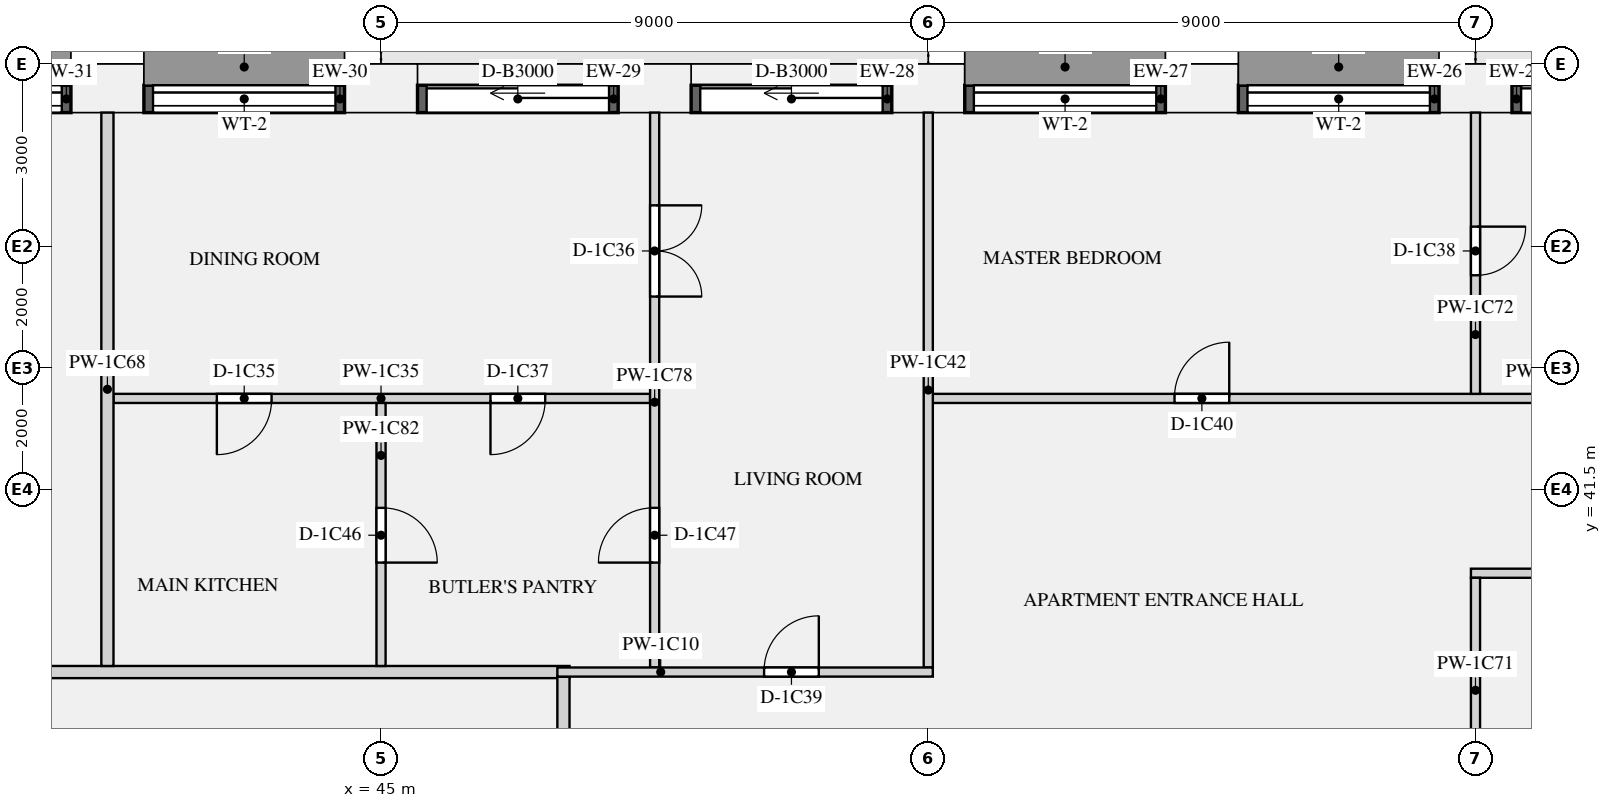
"""IFC4 building model, lengths in metres.
Left out: names, types, materials, properties, quantities, classifications, styles, units other than length and angle.
Written with IfcOpenShell. Run it as: python <this file> out.ifc"""

import sys

from ifc_helpers import new_model, si_unit, direction, frame, frame_2d, origin, origin_2d, place, context, subcontext, project, spatial, rectangle, extrude, element, fill, save


model = new_model("IFC4")
c1 = context("Model", 3, precision=1e-05, world=origin(), true_north=direction((0.0, 1.0)))
c2 = subcontext(c1, "Body", "Model", "MODEL_VIEW")
j1 = project(units=[si_unit("LENGTHUNIT", "METRE"), si_unit("PLANEANGLEUNIT", "RADIAN")], contexts=[c1])
p1 = place(None, origin())
s1 = spatial("IfcSite", under=j1, at=p1, CompositionType="ELEMENT")
p2 = place(p1, origin())
s2 = spatial("IfcBuilding", under=s1, at=p2, CompositionType="ELEMENT")
p3 = place(p2, frame((0.0, 0.0, 38.4)))
s3 = spatial("IfcBuildingStorey", under=s2, at=p3, CompositionType="ELEMENT", Elevation=38.4)
for number, where, z_axis, x_axis in (
    (1, (63.0, 48.1, 0.0), (0.0, 0.0, 1.0), (-1.0, 0.0, 0.0)),
    (2, (58.5, 48.1, 0.0), (0.0, 0.0, 1.0), (-1.0, 0.0, 0.0)),
    (3, (54.0, 48.1, 0.0), (0.0, 0.0, 1.0), (-1.0, 0.0, 0.0)),
    (4, (49.5, 48.1, 0.0), (0.0, 0.0, 1.0), (-1.0, 0.0, 0.0)),
    (5, (45.0, 48.1, 0.0), (0.0, 0.0, 1.0), (-1.0, 0.0, 0.0)),
    (6, (40.5, 48.1, 0.0), (0.0, 0.0, 1.0), (-1.0, 0.0, 0.0)),
):
    element("IfcColumn", number, at=place(p3, frame(where, z_axis=z_axis, x_axis=x_axis)), inside=s3, PredefinedType="USERDEFINED", context=c2, shape_type="SweptSolid", body=[
        extrude(rectangle(XDim=1.2, YDim=0.8, at=origin_2d()), origin(), (0.0, 0.0, 1.0), 3.15),
    ])
p4 = place(p3, frame((66.9, 47.925, 0.0), z_axis=(0.0, 0.0, 1.0), x_axis=(-1.0, 0.0, 0.0)))
e7 = element("IfcWall", 7, at=p4, inside=s3, PredefinedType="SOLIDWALL", context=c2, shape_type="SweptSolid", body=[
    extrude(rectangle(XDim=3.3, YDim=0.45, at=frame_2d((1.65, 0.0))), origin(), (0.0, 0.0, 1.0), 2.83),
])
p5 = place(p4, frame((0.15, 0.0, 0.0)))
e8 = element("IfcOpeningElement", 8, at=p5, cuts=e7, PredefinedType="OPENING", context=c2, shape_type="SweptSolid", body=[
    extrude(rectangle(XDim=3.0, YDim=2.3, at=frame_2d((1.5, 1.15))), frame((0.0, 0.235, 0.0), z_axis=(0.0, -1.0, 0.0), x_axis=(1.0, 0.0, 0.0)), (0.0, 0.0, 1.0), 0.47),
])
p6 = place(p3, frame((62.4, 47.925, 0.9), z_axis=(0.0, 0.0, 1.0), x_axis=(-1.0, 0.0, 0.0)))
e9 = element("IfcWall", 9, at=p6, inside=s3, PredefinedType="SOLIDWALL", context=c2, shape_type="SweptSolid", body=[
    extrude(rectangle(XDim=3.3, YDim=0.45, at=frame_2d((1.65, 0.0))), origin(), (0.0, 0.0, 1.0), 1.93),
])
p7 = place(p6, frame((0.15, 0.0, 0.15)))
e10 = element("IfcOpeningElement", 10, at=p7, cuts=e9, PredefinedType="OPENING", context=c2, shape_type="SweptSolid", body=[
    extrude(rectangle(XDim=3.0, YDim=1.5, at=frame_2d((1.5, 0.75))), frame((0.0, 0.235, 0.0), z_axis=(0.0, -1.0, 0.0), x_axis=(1.0, 0.0, 0.0)), (0.0, 0.0, 1.0), 0.47),
])
p8 = place(p3, frame((57.9, 47.925, 0.9), z_axis=(0.0, 0.0, 1.0), x_axis=(-1.0, 0.0, 0.0)))
e11 = element("IfcWall", 11, at=p8, inside=s3, PredefinedType="SOLIDWALL", context=c2, shape_type="SweptSolid", body=[
    extrude(rectangle(XDim=3.3, YDim=0.45, at=frame_2d((1.65, 0.0))), origin(), (0.0, 0.0, 1.0), 1.93),
])
p9 = place(p8, frame((0.15, 0.0, 0.15)))
e12 = element("IfcOpeningElement", 12, at=p9, cuts=e11, PredefinedType="OPENING", context=c2, shape_type="SweptSolid", body=[
    extrude(rectangle(XDim=3.0, YDim=1.5, at=frame_2d((1.5, 0.75))), frame((0.0, 0.235, 0.0), z_axis=(0.0, -1.0, 0.0), x_axis=(1.0, 0.0, 0.0)), (0.0, 0.0, 1.0), 0.47),
])
p10 = place(p3, frame((53.4, 47.925, 0.0), z_axis=(0.0, 0.0, 1.0), x_axis=(-1.0, 0.0, 0.0)))
e13 = element("IfcWall", 13, at=p10, inside=s3, PredefinedType="SOLIDWALL", context=c2, shape_type="SweptSolid", body=[
    extrude(rectangle(XDim=3.3, YDim=0.45, at=frame_2d((1.65, 0.0))), origin(), (0.0, 0.0, 1.0), 2.83),
])
p11 = place(p10, frame((0.15, 0.0, 0.0)))
e14 = element("IfcOpeningElement", 14, at=p11, cuts=e13, PredefinedType="OPENING", context=c2, shape_type="SweptSolid", body=[
    extrude(rectangle(XDim=3.0, YDim=2.3, at=frame_2d((1.5, 1.15))), frame((0.0, 0.235, 0.0), z_axis=(0.0, -1.0, 0.0), x_axis=(1.0, 0.0, 0.0)), (0.0, 0.0, 1.0), 0.47),
])
p12 = place(p3, frame((48.9, 47.925, 0.0), z_axis=(0.0, 0.0, 1.0), x_axis=(-1.0, 0.0, 0.0)))
e15 = element("IfcWall", 15, at=p12, inside=s3, PredefinedType="SOLIDWALL", context=c2, shape_type="SweptSolid", body=[
    extrude(rectangle(XDim=3.3, YDim=0.45, at=frame_2d((1.65, 0.0))), origin(), (0.0, 0.0, 1.0), 2.83),
])
p13 = place(p12, frame((0.15, 0.0, 0.0)))
e16 = element("IfcOpeningElement", 16, at=p13, cuts=e15, PredefinedType="OPENING", context=c2, shape_type="SweptSolid", body=[
    extrude(rectangle(XDim=3.0, YDim=2.3, at=frame_2d((1.5, 1.15))), frame((0.0, 0.235, 0.0), z_axis=(0.0, -1.0, 0.0), x_axis=(1.0, 0.0, 0.0)), (0.0, 0.0, 1.0), 0.47),
])
p14 = place(p3, frame((44.4, 47.925, 0.9), z_axis=(0.0, 0.0, 1.0), x_axis=(-1.0, 0.0, 0.0)))
e17 = element("IfcWall", 17, at=p14, inside=s3, PredefinedType="SOLIDWALL", context=c2, shape_type="SweptSolid", body=[
    extrude(rectangle(XDim=3.3, YDim=0.45, at=frame_2d((1.65, 0.0))), origin(), (0.0, 0.0, 1.0), 1.93),
])
p15 = place(p14, frame((0.15, 0.0, 0.15)))
e18 = element("IfcOpeningElement", 18, at=p15, cuts=e17, PredefinedType="OPENING", context=c2, shape_type="SweptSolid", body=[
    extrude(rectangle(XDim=3.0, YDim=1.5, at=frame_2d((1.5, 0.75))), frame((0.0, 0.235, 0.0), z_axis=(0.0, -1.0, 0.0), x_axis=(1.0, 0.0, 0.0)), (0.0, 0.0, 1.0), 0.47),
])
p16 = place(p3, frame((39.9, 47.925, 0.9), z_axis=(0.0, 0.0, 1.0), x_axis=(-1.0, 0.0, 0.0)))
e19 = element("IfcWall", 19, at=p16, inside=s3, PredefinedType="SOLIDWALL", context=c2, shape_type="SweptSolid", body=[
    extrude(rectangle(XDim=3.3, YDim=0.45, at=frame_2d((1.65, 0.0))), origin(), (0.0, 0.0, 1.0), 1.93),
])
p17 = place(p16, frame((0.15, 0.0, 0.15)))
e20 = element("IfcOpeningElement", 20, at=p17, cuts=e19, PredefinedType="OPENING", context=c2, shape_type="SweptSolid", body=[
    extrude(rectangle(XDim=3.0, YDim=1.5, at=frame_2d((1.5, 0.75))), frame((0.0, 0.235, 0.0), z_axis=(0.0, -1.0, 0.0), x_axis=(1.0, 0.0, 0.0)), (0.0, 0.0, 1.0), 0.47),
])
p18 = place(p3, frame((47.9, 38.5, 0.0), z_axis=(0.0, 0.0, 1.0), x_axis=(1.0, 0.0, 0.0)))
e21 = element("IfcWall", 21, at=p18, inside=s3, PredefinedType="PARTITIONING", context=c2, shape_type="SweptSolid", body=[
    extrude(rectangle(XDim=6.175, YDim=0.15, at=frame_2d((3.087, 0.0))), origin(), (0.0, 0.0, 1.0), 2.83),
])
p19 = place(p18, frame((3.4, 0.0, 0.0)))
e22 = element("IfcOpeningElement", 22, at=p19, cuts=e21, PredefinedType="OPENING", context=c2, shape_type="SweptSolid", body=[
    extrude(rectangle(XDim=0.9, YDim=2.1, at=frame_2d((0.45, 1.05))), frame((0.0, 0.085, 0.0), z_axis=(0.0, -1.0, 0.0), x_axis=(1.0, 0.0, 0.0)), (0.0, 0.0, 1.0), 0.17),
])
p20 = place(p3, frame((23.9, 38.5, 0.0), z_axis=(0.0, 0.0, 1.0), x_axis=(1.0, 0.0, 0.0)))
e23 = element("IfcWall", 23, at=p20, inside=s3, PredefinedType="PARTITIONING", context=c2, shape_type="SweptSolid", body=[
    extrude(rectangle(XDim=24.2, YDim=0.2, at=frame_2d((12.1, 0.0))), origin(), (0.0, 0.0, 1.0), 2.83),
])
p21 = place(p20, frame((3.55, 0.0, 0.0)))
e24 = element("IfcOpeningElement", 24, at=p21, cuts=e23, PredefinedType="OPENING", context=c2, shape_type="SweptSolid", body=[
    extrude(rectangle(XDim=1.1, YDim=2.1, at=frame_2d((0.55, 1.05))), frame((0.0, 0.11, 0.0), z_axis=(0.0, -1.0, 0.0), x_axis=(1.0, 0.0, 0.0)), (0.0, 0.0, 1.0), 0.22),
])
p22 = place(p3, frame((62.925, 40.125, 0.0), z_axis=(0.0, 0.0, 1.0), x_axis=(1.0, 0.0, 0.0)))
e25 = element("IfcWall", 25, at=p22, inside=s3, PredefinedType="PARTITIONING", context=c2, shape_type="SweptSolid", body=[
    extrude(rectangle(XDim=12.775, YDim=0.15, at=frame_2d((6.387, 0.0))), origin(), (0.0, 0.0, 1.0), 2.83),
])
p23 = place(p22, frame((4.125, 0.0, 0.0)))
e26 = element("IfcOpeningElement", 26, at=p23, cuts=e25, PredefinedType="OPENING", context=c2, shape_type="SweptSolid", body=[
    extrude(rectangle(XDim=0.9, YDim=2.1, at=frame_2d((0.45, 1.05))), frame((0.0, 0.085, 0.0), z_axis=(0.0, -1.0, 0.0), x_axis=(1.0, 0.0, 0.0)), (0.0, 0.0, 1.0), 0.17),
])
p24 = place(p3, frame((40.6, 43.0, 0.0), z_axis=(0.0, 0.0, 1.0), x_axis=(1.0, 0.0, 0.0)))
e27 = element("IfcWall", 27, at=p24, inside=s3, PredefinedType="PARTITIONING", context=c2, shape_type="SweptSolid", body=[
    extrude(rectangle(XDim=8.825, YDim=0.15, at=frame_2d((4.413, 0.0))), origin(), (0.0, 0.0, 1.0), 2.83),
])
p25 = place(p24, frame((1.7, 0.0, 0.0)))
e28 = element("IfcOpeningElement", 28, at=p25, cuts=e27, PredefinedType="OPENING", context=c2, shape_type="SweptSolid", body=[
    extrude(rectangle(XDim=0.9, YDim=2.1, at=frame_2d((0.45, 1.05))), frame((0.0, 0.085, 0.0), z_axis=(0.0, -1.0, 0.0), x_axis=(1.0, 0.0, 0.0)), (0.0, 0.0, 1.0), 0.17),
])
p26 = place(p24, frame((6.2, 0.0, 0.0)))
e29 = element("IfcOpeningElement", 29, at=p26, cuts=e27, PredefinedType="OPENING", context=c2, shape_type="SweptSolid", body=[
    extrude(rectangle(XDim=0.9, YDim=2.1, at=frame_2d((0.45, 1.05))), frame((0.0, 0.085, 0.0), z_axis=(0.0, -1.0, 0.0), x_axis=(1.0, 0.0, 0.0)), (0.0, 0.0, 1.0), 0.17),
])
p27 = place(p3, frame((54.075, 43.0, 0.0), z_axis=(0.0, 0.0, 1.0), x_axis=(1.0, 0.0, 0.0)))
e30 = element("IfcWall", 30, at=p27, inside=s3, PredefinedType="PARTITIONING", context=c2, shape_type="SweptSolid", body=[
    extrude(rectangle(XDim=17.85, YDim=0.15, at=frame_2d((8.925, 0.0))), origin(), (0.0, 0.0, 1.0), 2.83),
])
p28 = place(p27, frame((15.225, 0.0, 0.0)))
e31 = element("IfcOpeningElement", 31, at=p28, cuts=e30, PredefinedType="OPENING", context=c2, shape_type="SweptSolid", body=[
    extrude(rectangle(XDim=0.9, YDim=2.1, at=frame_2d((0.45, 1.05))), frame((0.0, 0.085, 0.0), z_axis=(0.0, -1.0, 0.0), x_axis=(1.0, 0.0, 0.0)), (0.0, 0.0, 1.0), 0.17),
])
p29 = place(p27, frame((3.975, 0.0, 0.0)))
e32 = element("IfcOpeningElement", 32, at=p29, cuts=e30, PredefinedType="OPENING", context=c2, shape_type="SweptSolid", body=[
    extrude(rectangle(XDim=0.9, YDim=2.1, at=frame_2d((0.45, 1.05))), frame((0.0, 0.085, 0.0), z_axis=(0.0, -1.0, 0.0), x_axis=(1.0, 0.0, 0.0)), (0.0, 0.0, 1.0), 0.17),
])
p30 = place(p3, frame((54.0, 38.575, 0.0), z_axis=(0.0, 0.0, 1.0), x_axis=(0.0, 1.0, 0.0)))
e33 = element("IfcWall", 33, at=p30, inside=s3, PredefinedType="PARTITIONING", context=c2, shape_type="SweptSolid", body=[
    extrude(rectangle(XDim=9.125, YDim=0.15, at=frame_2d((4.562, 0.0))), origin(), (0.0, 0.0, 1.0), 2.83),
])
p31 = place(p3, frame((48.0, 27.1, 0.0), z_axis=(0.0, 0.0, 1.0), x_axis=(0.0, 1.0, 0.0)))
e34 = element("IfcWall", 34, at=p31, inside=s3, PredefinedType="PARTITIONING", context=c2, shape_type="SweptSolid", body=[
    extrude(rectangle(XDim=11.325, YDim=0.2, at=frame_2d((5.663, 0.0))), origin(), (0.0, 0.0, 1.0), 2.83),
])
p32 = place(p31, frame((5.35, 0.0, 0.0)))
e35 = element("IfcOpeningElement", 35, at=p32, cuts=e34, PredefinedType="OPENING", context=c2, shape_type="SweptSolid", body=[
    extrude(rectangle(XDim=1.1, YDim=2.1, at=frame_2d((0.55, 1.05))), frame((0.0, 0.11, 0.0), z_axis=(0.0, -1.0, 0.0), x_axis=(1.0, 0.0, 0.0)), (0.0, 0.0, 1.0), 0.22),
])
p33 = place(p3, frame((40.5, 38.6, 0.0), z_axis=(0.0, 0.0, 1.0), x_axis=(0.0, 1.0, 0.0)))
e36 = element("IfcWall", 36, at=p33, inside=s3, PredefinedType="PARTITIONING", context=c2, shape_type="SweptSolid", body=[
    extrude(rectangle(XDim=9.1, YDim=0.2, at=frame_2d((4.55, 0.0))), origin(), (0.0, 0.0, 1.0), 2.83),
])
p34 = place(p3, frame((63.0, 36.35, 0.0), z_axis=(0.0, 0.0, 1.0), x_axis=(0.0, 1.0, 0.0)))
e37 = element("IfcWall", 37, at=p34, inside=s3, PredefinedType="PARTITIONING", context=c2, shape_type="SweptSolid", body=[
    extrude(rectangle(XDim=3.7, YDim=0.15, at=frame_2d((1.85, 0.0))), origin(), (0.0, 0.0, 1.0), 2.83),
])
p35 = place(p3, frame((63.0, 43.075, 0.0), z_axis=(0.0, 0.0, 1.0), x_axis=(0.0, 1.0, 0.0)))
e38 = element("IfcWall", 38, at=p35, inside=s3, PredefinedType="PARTITIONING", context=c2, shape_type="SweptSolid", body=[
    extrude(rectangle(XDim=4.625, YDim=0.15, at=frame_2d((2.312, 0.0))), origin(), (0.0, 0.0, 1.0), 2.83),
])
p36 = place(p35, frame((1.95, 0.0, 0.0)))
e39 = element("IfcOpeningElement", 39, at=p36, cuts=e38, PredefinedType="OPENING", context=c2, shape_type="SweptSolid", body=[
    extrude(rectangle(XDim=0.8, YDim=2.1, at=frame_2d((0.4, 1.05))), frame((0.0, 0.085, 0.0), z_axis=(0.0, -1.0, 0.0), x_axis=(1.0, 0.0, 0.0)), (0.0, 0.0, 1.0), 0.17),
])
p37 = place(p3, frame((49.5, 38.575, 0.0), z_axis=(0.0, 0.0, 1.0), x_axis=(0.0, 1.0, 0.0)))
e40 = element("IfcWall", 40, at=p37, inside=s3, PredefinedType="PARTITIONING", context=c2, shape_type="SweptSolid", body=[
    extrude(rectangle(XDim=9.125, YDim=0.15, at=frame_2d((4.562, 0.0))), origin(), (0.0, 0.0, 1.0), 2.83),
])
p38 = place(p37, frame((6.1, 0.0, 0.0)))
e41 = element("IfcOpeningElement", 41, at=p38, cuts=e40, PredefinedType="OPENING", context=c2, shape_type="SweptSolid", body=[
    extrude(rectangle(XDim=1.5, YDim=2.1, at=frame_2d((0.75, 1.05))), frame((0.0, 0.085, 0.0), z_axis=(0.0, -1.0, 0.0), x_axis=(1.0, 0.0, 0.0)), (0.0, 0.0, 1.0), 0.17),
])
p39 = place(p37, frame((1.725, 0.0, 0.0)))
e42 = element("IfcOpeningElement", 42, at=p39, cuts=e40, PredefinedType="OPENING", context=c2, shape_type="SweptSolid", body=[
    extrude(rectangle(XDim=0.9, YDim=2.1, at=frame_2d((0.45, 1.05))), frame((0.0, 0.085, 0.0), z_axis=(0.0, -1.0, 0.0), x_axis=(1.0, 0.0, 0.0)), (0.0, 0.0, 1.0), 0.17),
])
p40 = place(p3, frame((45.0, 38.6, 0.0), z_axis=(0.0, 0.0, 1.0), x_axis=(0.0, 1.0, 0.0)))
e43 = element("IfcWall", 43, at=p40, inside=s3, PredefinedType="PARTITIONING", context=c2, shape_type="SweptSolid", body=[
    extrude(rectangle(XDim=4.325, YDim=0.15, at=frame_2d((2.163, 0.0))), origin(), (0.0, 0.0, 1.0), 2.83),
])
p41 = place(p40, frame((1.7, 0.0, 0.0)))
e44 = element("IfcOpeningElement", 44, at=p41, cuts=e43, PredefinedType="OPENING", context=c2, shape_type="SweptSolid", body=[
    extrude(rectangle(XDim=0.9, YDim=2.1, at=frame_2d((0.45, 1.05))), frame((0.0, 0.085, 0.0), z_axis=(0.0, -1.0, 0.0), x_axis=(1.0, 0.0, 0.0)), (0.0, 0.0, 1.0), 0.17),
])
p42 = place(p5, origin())
e45 = element("IfcDoor", 45, at=p42, inside=s3, OperationType="SLIDING_TO_LEFT", PredefinedType="DOOR", context=c2, shape_type="SweptSolid", body=[
    extrude(rectangle(XDim=3.0, YDim=2.3, at=frame_2d((1.5, 1.15))), frame((0.0, -0.07, 0.0), z_axis=(0.0, -1.0, 0.0), x_axis=(1.0, 0.0, 0.0)), (0.0, 0.0, 1.0), 0.05),
])
fill(e8, e45)
p43 = place(p7, origin())
e46 = element("IfcWindow", 46, at=p43, inside=s3, PartitioningType="SINGLE_PANEL", PredefinedType="WINDOW", context=c2, shape_type="SweptSolid", body=[
    extrude(rectangle(XDim=3.0, YDim=1.5, at=frame_2d((1.5, 0.75))), frame((0.0, -0.065, 0.0), z_axis=(0.0, -1.0, 0.0), x_axis=(1.0, 0.0, 0.0)), (0.0, 0.0, 1.0), 0.06),
])
fill(e10, e46)
p44 = place(p9, origin())
e47 = element("IfcWindow", 47, at=p44, inside=s3, PartitioningType="SINGLE_PANEL", PredefinedType="WINDOW", context=c2, shape_type="SweptSolid", body=[
    extrude(rectangle(XDim=3.0, YDim=1.5, at=frame_2d((1.5, 0.75))), frame((0.0, -0.065, 0.0), z_axis=(0.0, -1.0, 0.0), x_axis=(1.0, 0.0, 0.0)), (0.0, 0.0, 1.0), 0.06),
])
fill(e12, e47)
p45 = place(p11, origin())
e48 = element("IfcDoor", 48, at=p45, inside=s3, OperationType="SLIDING_TO_LEFT", PredefinedType="DOOR", context=c2, shape_type="SweptSolid", body=[
    extrude(rectangle(XDim=3.0, YDim=2.3, at=frame_2d((1.5, 1.15))), frame((0.0, -0.07, 0.0), z_axis=(0.0, -1.0, 0.0), x_axis=(1.0, 0.0, 0.0)), (0.0, 0.0, 1.0), 0.05),
])
fill(e14, e48)
p46 = place(p13, origin())
e49 = element("IfcDoor", 49, at=p46, inside=s3, OperationType="SLIDING_TO_LEFT", PredefinedType="DOOR", context=c2, shape_type="SweptSolid", body=[
    extrude(rectangle(XDim=3.0, YDim=2.3, at=frame_2d((1.5, 1.15))), frame((0.0, -0.07, 0.0), z_axis=(0.0, -1.0, 0.0), x_axis=(1.0, 0.0, 0.0)), (0.0, 0.0, 1.0), 0.05),
])
fill(e16, e49)
p47 = place(p15, origin())
e50 = element("IfcWindow", 50, at=p47, inside=s3, PartitioningType="SINGLE_PANEL", PredefinedType="WINDOW", context=c2, shape_type="SweptSolid", body=[
    extrude(rectangle(XDim=3.0, YDim=1.5, at=frame_2d((1.5, 0.75))), frame((0.0, -0.065, 0.0), z_axis=(0.0, -1.0, 0.0), x_axis=(1.0, 0.0, 0.0)), (0.0, 0.0, 1.0), 0.06),
])
fill(e18, e50)
p48 = place(p17, origin())
e51 = element("IfcWindow", 51, at=p48, inside=s3, PartitioningType="SINGLE_PANEL", PredefinedType="WINDOW", context=c2, shape_type="SweptSolid", body=[
    extrude(rectangle(XDim=3.0, YDim=1.5, at=frame_2d((1.5, 0.75))), frame((0.0, -0.065, 0.0), z_axis=(0.0, -1.0, 0.0), x_axis=(1.0, 0.0, 0.0)), (0.0, 0.0, 1.0), 0.06),
])
fill(e20, e51)
p49 = place(p25, frame((0.9, 0.0, 0.0), z_axis=(0.0, 0.0, 1.0), x_axis=(-1.0, 0.0, 0.0)))
e52 = element("IfcDoor", 52, at=p49, inside=s3, OperationType="SINGLE_SWING_RIGHT", PredefinedType="DOOR", context=c2, shape_type="SweptSolid", body=[
    extrude(rectangle(XDim=0.9, YDim=2.1, at=frame_2d((0.45, 1.05))), frame((0.0, 0.025, 0.0), z_axis=(0.0, -1.0, 0.0), x_axis=(1.0, 0.0, 0.0)), (0.0, 0.0, 1.0), 0.05),
])
fill(e28, e52)
p50 = place(p38, frame((1.5, 0.0, 0.0), z_axis=(0.0, 0.0, 1.0), x_axis=(-1.0, 0.0, 0.0)))
e53 = element("IfcDoor", 53, at=p50, inside=s3, OperationType="DOUBLE_DOOR_SINGLE_SWING", PredefinedType="DOOR", context=c2, shape_type="SweptSolid", body=[
    extrude(rectangle(XDim=1.5, YDim=2.1, at=frame_2d((0.75, 1.05))), frame((0.0, 0.025, 0.0), z_axis=(0.0, -1.0, 0.0), x_axis=(1.0, 0.0, 0.0)), (0.0, 0.0, 1.0), 0.05),
])
fill(e41, e53)
p51 = place(p26, frame((0.9, 0.0, 0.0), z_axis=(0.0, 0.0, 1.0), x_axis=(-1.0, 0.0, 0.0)))
e54 = element("IfcDoor", 54, at=p51, inside=s3, OperationType="SINGLE_SWING_RIGHT", PredefinedType="DOOR", context=c2, shape_type="SweptSolid", body=[
    extrude(rectangle(XDim=0.9, YDim=2.1, at=frame_2d((0.45, 1.05))), frame((0.0, 0.025, 0.0), z_axis=(0.0, -1.0, 0.0), x_axis=(1.0, 0.0, 0.0)), (0.0, 0.0, 1.0), 0.05),
])
fill(e29, e54)
p52 = place(p36, frame((0.8, 0.0, 0.0), z_axis=(0.0, 0.0, 1.0), x_axis=(-1.0, 0.0, 0.0)))
e55 = element("IfcDoor", 55, at=p52, inside=s3, OperationType="SINGLE_SWING_LEFT", PredefinedType="DOOR", context=c2, shape_type="SweptSolid", body=[
    extrude(rectangle(XDim=0.8, YDim=2.1, at=frame_2d((0.4, 1.05))), frame((0.0, 0.025, 0.0), z_axis=(0.0, -1.0, 0.0), x_axis=(1.0, 0.0, 0.0)), (0.0, 0.0, 1.0), 0.05),
])
fill(e39, e55)
p53 = place(p19, origin())
e56 = element("IfcDoor", 56, at=p53, inside=s3, OperationType="SINGLE_SWING_RIGHT", PredefinedType="DOOR", context=c2, shape_type="SweptSolid", body=[
    extrude(rectangle(XDim=0.9, YDim=2.1, at=frame_2d((0.45, 1.05))), frame((0.0, 0.025, 0.0), z_axis=(0.0, -1.0, 0.0), x_axis=(1.0, 0.0, 0.0)), (0.0, 0.0, 1.0), 0.05),
])
fill(e22, e56)
p54 = place(p29, origin())
e57 = element("IfcDoor", 57, at=p54, inside=s3, OperationType="SINGLE_SWING_RIGHT", PredefinedType="DOOR", context=c2, shape_type="SweptSolid", body=[
    extrude(rectangle(XDim=0.9, YDim=2.1, at=frame_2d((0.45, 1.05))), frame((0.0, 0.025, 0.0), z_axis=(0.0, -1.0, 0.0), x_axis=(1.0, 0.0, 0.0)), (0.0, 0.0, 1.0), 0.05),
])
fill(e32, e57)
p55 = place(p41, frame((0.9, 0.0, 0.0), z_axis=(0.0, 0.0, 1.0), x_axis=(-1.0, 0.0, 0.0)))
e58 = element("IfcDoor", 58, at=p55, inside=s3, OperationType="SINGLE_SWING_RIGHT", PredefinedType="DOOR", context=c2, shape_type="SweptSolid", body=[
    extrude(rectangle(XDim=0.9, YDim=2.1, at=frame_2d((0.45, 1.05))), frame((0.0, 0.025, 0.0), z_axis=(0.0, -1.0, 0.0), x_axis=(1.0, 0.0, 0.0)), (0.0, 0.0, 1.0), 0.05),
])
fill(e44, e58)
p56 = place(p39, origin())
e59 = element("IfcDoor", 59, at=p56, inside=s3, OperationType="SINGLE_SWING_LEFT", PredefinedType="DOOR", context=c2, shape_type="SweptSolid", body=[
    extrude(rectangle(XDim=0.9, YDim=2.1, at=frame_2d((0.45, 1.05))), frame((0.0, 0.025, 0.0), z_axis=(0.0, -1.0, 0.0), x_axis=(1.0, 0.0, 0.0)), (0.0, 0.0, 1.0), 0.05),
])
fill(e42, e59)
save(model, sys.argv[1])
